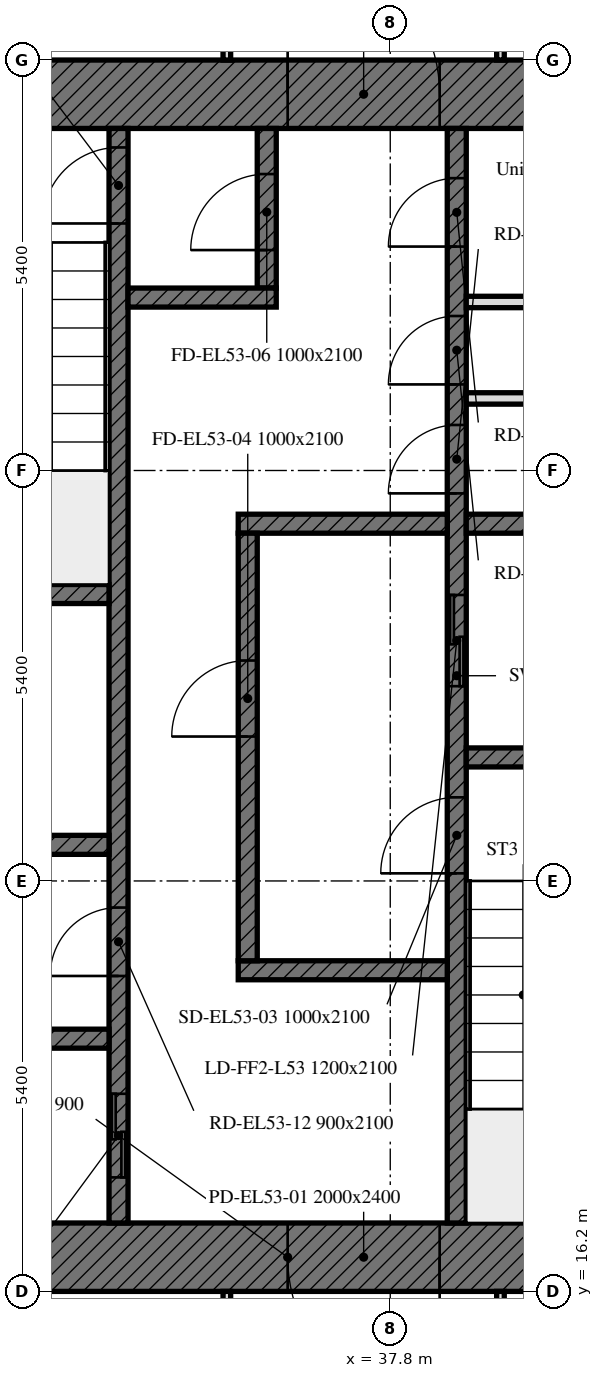
"""IFC4 building model, lengths in metres.
Left out: names, types, materials, properties, quantities, classifications, styles, units other than length and angle.
Written with IfcOpenShell. Run it as: python <this file> out.ifc"""

import sys

from ifc_helpers import new_model, si_unit, direction, frame, frame_2d, origin, place, context, subcontext, project, spatial, rectangle, extrude, element, fill, save


model = new_model("IFC4")
c1 = context("Model", 3, precision=1e-05, world=origin(), true_north=direction((0.0, 1.0)))
c2 = subcontext(c1, "Body", "Model", "MODEL_VIEW")
j1 = project(units=[si_unit("LENGTHUNIT", "METRE"), si_unit("PLANEANGLEUNIT", "RADIAN")], contexts=[c1])
p1 = place(None, origin())
s1 = spatial("IfcSite", under=j1, at=p1, CompositionType="ELEMENT")
p2 = place(p1, origin())
s2 = spatial("IfcBuilding", under=s1, at=p2, CompositionType="ELEMENT")
p3 = place(p2, frame((0.0, 0.0, 213.7)))
s3 = spatial("IfcBuildingStorey", under=s2, at=p3, CompositionType="ELEMENT", Elevation=213.7)
p4 = place(p3, frame((42.0, 16.65, 0.0), z_axis=(0.0, 0.0, 1.0), x_axis=(-1.0, 0.0, 0.0)))
e1 = element("IfcWall", 1, at=p4, inside=s3, PredefinedType="SOLIDWALL", context=c2, shape_type="SweptSolid", body=[
    extrude(rectangle(XDim=11.1, YDim=0.9, at=frame_2d((5.55, 0.0))), origin(), (0.0, 0.0, 1.0), 3.0),
])
p5 = place(p4, frame((3.55, 0.0, 0.0)))
e2 = element("IfcOpeningElement", 2, at=p5, cuts=e1, PredefinedType="OPENING", context=c2, shape_type="SweptSolid", body=[
    extrude(rectangle(XDim=2.0, YDim=2.4, at=frame_2d((1.0, 1.2))), frame((0.0, 0.45, 0.0), z_axis=(0.0, -1.0, 0.0), x_axis=(1.0, 0.0, 0.0)), (0.0, 0.0, 1.0), 0.9),
])
p6 = place(p3, frame((30.9, 31.95, 0.0), z_axis=(0.0, 0.0, 1.0), x_axis=(1.0, 0.0, 0.0)))
e3 = element("IfcWall", 3, at=p6, inside=s3, PredefinedType="SOLIDWALL", context=c2, shape_type="SweptSolid", body=[
    extrude(rectangle(XDim=11.1, YDim=0.9, at=frame_2d((5.55, 0.0))), origin(), (0.0, 0.0, 1.0), 3.0),
])
p7 = place(p6, frame((5.55, 0.0, 0.0)))
e4 = element("IfcOpeningElement", 4, at=p7, cuts=e3, PredefinedType="OPENING", context=c2, shape_type="SweptSolid", body=[
    extrude(rectangle(XDim=2.0, YDim=2.4, at=frame_2d((1.0, 1.2))), frame((0.0, 0.45, 0.0), z_axis=(0.0, -1.0, 0.0), x_axis=(1.0, 0.0, 0.0)), (0.0, 0.0, 1.0), 0.9),
])
p8 = place(p3, frame((38.675, 17.1, 0.0), z_axis=(0.0, 0.0, 1.0), x_axis=(0.0, 1.0, 0.0)))
e5 = element("IfcWall", 5, at=p8, inside=s3, PredefinedType="SOLIDWALL", context=c2, shape_type="SweptSolid", body=[
    extrude(rectangle(XDim=14.4, YDim=0.25, at=frame_2d((7.2, 0.0))), origin(), (0.0, 0.0, 1.0), 3.0),
])
p9 = place(p8, frame((4.6, 0.0, 0.0)))
e6 = element("IfcOpeningElement", 6, at=p9, cuts=e5, PredefinedType="OPENING", context=c2, shape_type="SweptSolid", body=[
    extrude(rectangle(XDim=1.0, YDim=2.1, at=frame_2d((0.5, 1.05))), frame((0.0, 0.125, 0.0), z_axis=(0.0, -1.0, 0.0), x_axis=(1.0, 0.0, 0.0)), (0.0, 0.0, 1.0), 0.25),
])
p10 = place(p8, frame((7.062, 0.0, 0.0)))
e7 = element("IfcOpeningElement", 7, at=p10, cuts=e5, PredefinedType="OPENING", context=c2, shape_type="SweptSolid", body=[
    extrude(rectangle(XDim=1.2, YDim=2.1, at=frame_2d((0.6, 1.05))), frame((0.0, 0.125, 0.0), z_axis=(0.0, -1.0, 0.0), x_axis=(1.0, 0.0, 0.0)), (0.0, 0.0, 1.0), 0.25),
])
p11 = place(p8, frame((9.599, 0.0, 0.0)))
e8 = element("IfcOpeningElement", 8, at=p11, cuts=e5, PredefinedType="OPENING", context=c2, shape_type="SweptSolid", body=[
    extrude(rectangle(XDim=0.9, YDim=2.1, at=frame_2d((0.45, 1.05))), frame((0.0, 0.125, 0.0), z_axis=(0.0, -1.0, 0.0), x_axis=(1.0, 0.0, 0.0)), (0.0, 0.0, 1.0), 0.25),
])
p12 = place(p8, frame((11.032, 0.0, 0.0)))
e9 = element("IfcOpeningElement", 9, at=p12, cuts=e5, PredefinedType="OPENING", context=c2, shape_type="SweptSolid", body=[
    extrude(rectangle(XDim=0.9, YDim=2.1, at=frame_2d((0.45, 1.05))), frame((0.0, 0.125, 0.0), z_axis=(0.0, -1.0, 0.0), x_axis=(1.0, 0.0, 0.0)), (0.0, 0.0, 1.0), 0.25),
])
p13 = place(p8, frame((12.846, 0.0, 0.0)))
e10 = element("IfcOpeningElement", 10, at=p13, cuts=e5, PredefinedType="OPENING", context=c2, shape_type="SweptSolid", body=[
    extrude(rectangle(XDim=0.9, YDim=2.1, at=frame_2d((0.45, 1.05))), frame((0.0, 0.125, 0.0), z_axis=(0.0, -1.0, 0.0), x_axis=(1.0, 0.0, 0.0)), (0.0, 0.0, 1.0), 0.25),
])
p14 = place(p3, frame((34.225, 17.1, 0.0), z_axis=(0.0, 0.0, 1.0), x_axis=(0.0, 1.0, 0.0)))
e11 = element("IfcWall", 11, at=p14, inside=s3, PredefinedType="SOLIDWALL", context=c2, shape_type="SweptSolid", body=[
    extrude(rectangle(XDim=14.4, YDim=0.25, at=frame_2d((7.2, 0.0))), origin(), (0.0, 0.0, 1.0), 3.0),
])
p15 = place(p14, frame((13.15, 0.0, 0.0)))
e12 = element("IfcOpeningElement", 12, at=p15, cuts=e11, PredefinedType="OPENING", context=c2, shape_type="SweptSolid", body=[
    extrude(rectangle(XDim=1.0, YDim=2.1, at=frame_2d((0.5, 1.05))), frame((0.0, 0.125, 0.0), z_axis=(0.0, -1.0, 0.0), x_axis=(1.0, 0.0, 0.0)), (0.0, 0.0, 1.0), 0.25),
])
p16 = place(p14, frame((0.6, 0.0, 0.0)))
e13 = element("IfcOpeningElement", 13, at=p16, cuts=e11, PredefinedType="OPENING", context=c2, shape_type="SweptSolid", body=[
    extrude(rectangle(XDim=1.1, YDim=2.1, at=frame_2d((0.55, 1.05))), frame((0.0, 0.125, 0.0), z_axis=(0.0, -1.0, 0.0), x_axis=(1.0, 0.0, 0.0)), (0.0, 0.0, 1.0), 0.25),
])
p17 = place(p14, frame((3.25, 0.0, 0.0)))
e14 = element("IfcOpeningElement", 14, at=p17, cuts=e11, PredefinedType="OPENING", context=c2, shape_type="SweptSolid", body=[
    extrude(rectangle(XDim=0.9, YDim=2.1, at=frame_2d((0.45, 1.05))), frame((0.0, 0.125, 0.0), z_axis=(0.0, -1.0, 0.0), x_axis=(1.0, 0.0, 0.0)), (0.0, 0.0, 1.0), 0.25),
])
p18 = place(p3, frame((38.8, 23.225, 0.0), z_axis=(0.0, 0.0, 1.0), x_axis=(1.0, 0.0, 0.0)))
e15 = element("IfcWall", 15, at=p18, inside=s3, PredefinedType="SOLIDWALL", context=c2, shape_type="SweptSolid", body=[
    extrude(rectangle(XDim=3.2, YDim=0.25, at=frame_2d((1.6, 0.0))), origin(), (0.0, 0.0, 1.0), 3.0),
])
for number, where, z_axis, x_axis in (
    (16, (30.9, 25.375, 0.0), (0.0, 0.0, 1.0), (1.0, 0.0, 0.0)),
    (17, (30.9, 22.075, 0.0), (0.0, 0.0, 1.0), (1.0, 0.0, 0.0)),
):
    element("IfcWall", number, at=place(p3, frame(where, z_axis=z_axis, x_axis=x_axis)), inside=s3, PredefinedType="SOLIDWALL", context=c2, shape_type="SweptSolid", body=[
        extrude(rectangle(XDim=3.2, YDim=0.25, at=frame_2d((1.6, 0.0))), origin(), (0.0, 0.0, 1.0), 3.0),
    ])
p19 = place(p3, frame((38.8, 26.3, 0.0), z_axis=(0.0, 0.0, 1.0), x_axis=(1.0, 0.0, 0.0)))
e18 = element("IfcWall", 18, at=p19, inside=s3, PredefinedType="SOLIDWALL", context=c2, shape_type="SweptSolid", body=[
    extrude(rectangle(XDim=3.2, YDim=0.25, at=frame_2d((1.6, 0.0))), origin(), (0.0, 0.0, 1.0), 3.0),
])
for number, where, z_axis, x_axis in (
    (19, (35.8, 26.3, 0.0), (0.0, 0.0, 1.0), (1.0, 0.0, 0.0)),
    (20, (35.8, 20.425, 0.0), (0.0, 0.0, 1.0), (1.0, 0.0, 0.0)),
):
    element("IfcWall", number, at=place(p3, frame(where, z_axis=z_axis, x_axis=x_axis)), inside=s3, PredefinedType="SOLIDWALL", context=c2, shape_type="SweptSolid", body=[
        extrude(rectangle(XDim=2.75, YDim=0.25, at=frame_2d((1.375, 0.0))), origin(), (0.0, 0.0, 1.0), 3.0),
    ])
p20 = place(p3, frame((36.175, 29.4, 0.0), z_axis=(0.0, 0.0, 1.0), x_axis=(0.0, 1.0, 0.0)))
e21 = element("IfcWall", 21, at=p20, inside=s3, PredefinedType="SOLIDWALL", context=c2, shape_type="SweptSolid", body=[
    extrude(rectangle(XDim=2.1, YDim=0.25, at=frame_2d((1.05, 0.0))), origin(), (0.0, 0.0, 1.0), 3.0),
])
p21 = place(p20, frame((0.5, 0.0, 0.0)))
e22 = element("IfcOpeningElement", 22, at=p21, cuts=e21, PredefinedType="OPENING", context=c2, shape_type="SweptSolid", body=[
    extrude(rectangle(XDim=1.0, YDim=2.1, at=frame_2d((0.5, 1.05))), frame((0.0, 0.125, 0.0), z_axis=(0.0, -1.0, 0.0), x_axis=(1.0, 0.0, 0.0)), (0.0, 0.0, 1.0), 0.25),
])
p22 = place(p3, frame((34.35, 29.275, 0.0), z_axis=(0.0, 0.0, 1.0), x_axis=(1.0, 0.0, 0.0)))
e23 = element("IfcWall", 23, at=p22, inside=s3, PredefinedType="SOLIDWALL", context=c2, shape_type="SweptSolid", body=[
    extrude(rectangle(XDim=1.95, YDim=0.25, at=frame_2d((0.975, 0.0))), origin(), (0.0, 0.0, 1.0), 3.0),
])
p23 = place(p3, frame((35.925, 20.55, 0.0), z_axis=(0.0, 0.0, 1.0), x_axis=(0.0, 1.0, 0.0)))
e24 = element("IfcWall", 24, at=p23, inside=s3, PredefinedType="SOLIDWALL", context=c2, shape_type="SweptSolid", body=[
    extrude(rectangle(XDim=5.625, YDim=0.25, at=frame_2d((2.812, 0.0))), origin(), (0.0, 0.0, 1.0), 3.0),
])
p24 = place(p23, frame((2.95, 0.0, 0.0)))
e25 = element("IfcOpeningElement", 25, at=p24, cuts=e24, PredefinedType="OPENING", context=c2, shape_type="SweptSolid", body=[
    extrude(rectangle(XDim=1.0, YDim=2.1, at=frame_2d((0.5, 1.05))), frame((0.0, 0.125, 0.0), z_axis=(0.0, -1.0, 0.0), x_axis=(1.0, 0.0, 0.0)), (0.0, 0.0, 1.0), 0.25),
])
p25 = place(p3, frame((30.9, 19.525, 0.0), z_axis=(0.0, 0.0, 1.0), x_axis=(1.0, 0.0, 0.0)))
e26 = element("IfcWall", 26, at=p25, inside=s3, PredefinedType="SOLIDWALL", context=c2, shape_type="SweptSolid", body=[
    extrude(rectangle(XDim=3.2, YDim=0.25, at=frame_2d((1.6, 0.0))), origin(), (0.0, 0.0, 1.0), 3.0),
])
for number, where, z_axis, x_axis in (
    (27, (38.8, 27.948, 0.0), (0.0, 0.0, 1.0), (1.0, 0.0, 0.0)),
    (28, (38.8, 29.217, 0.0), (0.0, 0.0, 1.0), (1.0, 0.0, 0.0)),
):
    element("IfcWall", number, at=place(p3, frame(where, z_axis=z_axis, x_axis=x_axis)), inside=s3, PredefinedType="PARTITIONING", context=c2, shape_type="SweptSolid", body=[
        extrude(rectangle(XDim=3.2, YDim=0.15, at=frame_2d((1.6, 0.0))), origin(), (0.0, 0.0, 1.0), 3.0),
    ])
for number, where, z_axis, x_axis in (
    (29, (39.25, 32.4, 0.0), (0.0, 0.0, 1.0), (0.0, 1.0, 0.0)),
    (30, (35.65, 38.175, 0.0), (0.0, 0.0, 1.0), (0.0, -1.0, 0.0)),
):
    element("IfcWall", number, at=place(p3, frame(where, z_axis=z_axis, x_axis=x_axis)), inside=s3, PredefinedType="PARTITIONING", context=c2, shape_type="SweptSolid", body=[
        extrude(rectangle(XDim=5.775, YDim=0.1, at=frame_2d((2.888, 0.0))), origin(), (0.0, 0.0, 1.0), 3.0),
    ])
for number, where, z_axis, x_axis in (
    (31, (39.25, 13.575, 0.0), (0.0, 0.0, 1.0), (0.0, 1.0, 0.0)),
    (32, (35.65, 16.2, 0.0), (0.0, 0.0, 1.0), (0.0, -1.0, 0.0)),
):
    element("IfcWall", number, at=place(p3, frame(where, z_axis=z_axis, x_axis=x_axis)), inside=s3, PredefinedType="PARTITIONING", context=c2, shape_type="SweptSolid", body=[
        extrude(rectangle(XDim=2.625, YDim=0.1, at=frame_2d((1.312, 0.0))), origin(), (0.0, 0.0, 1.0), 3.0),
    ])
p26 = place(p5, origin())
e33 = element("IfcDoor", 33, at=p26, inside=s3, OperationType="DOUBLE_DOOR_SINGLE_SWING", PredefinedType="DOOR", context=c2, shape_type="SweptSolid", body=[
    extrude(rectangle(XDim=2.0, YDim=2.4, at=frame_2d((1.0, 1.2))), frame((0.0, 0.025, 0.0), z_axis=(0.0, -1.0, 0.0), x_axis=(1.0, 0.0, 0.0)), (0.0, 0.0, 1.0), 0.05),
])
fill(e2, e33)
p27 = place(p7, origin())
e34 = element("IfcDoor", 34, at=p27, inside=s3, OperationType="DOUBLE_DOOR_SINGLE_SWING", PredefinedType="DOOR", context=c2, shape_type="SweptSolid", body=[
    extrude(rectangle(XDim=2.0, YDim=2.4, at=frame_2d((1.0, 1.2))), frame((0.0, 0.025, 0.0), z_axis=(0.0, -1.0, 0.0), x_axis=(1.0, 0.0, 0.0)), (0.0, 0.0, 1.0), 0.05),
])
fill(e4, e34)
p28 = place(p9, origin())
e35 = element("IfcDoor", 35, at=p28, inside=s3, OperationType="SINGLE_SWING_LEFT", PredefinedType="DOOR", context=c2, shape_type="SweptSolid", body=[
    extrude(rectangle(XDim=1.0, YDim=2.1, at=frame_2d((0.5, 1.05))), frame((0.0, 0.025, 0.0), z_axis=(0.0, -1.0, 0.0), x_axis=(1.0, 0.0, 0.0)), (0.0, 0.0, 1.0), 0.05),
])
fill(e6, e35)
p29 = place(p24, origin())
e36 = element("IfcDoor", 36, at=p29, inside=s3, OperationType="SINGLE_SWING_LEFT", PredefinedType="DOOR", context=c2, shape_type="SweptSolid", body=[
    extrude(rectangle(XDim=1.0, YDim=2.1, at=frame_2d((0.5, 1.05))), frame((0.0, 0.025, 0.0), z_axis=(0.0, -1.0, 0.0), x_axis=(1.0, 0.0, 0.0)), (0.0, 0.0, 1.0), 0.05),
])
fill(e25, e36)
p30 = place(p15, origin())
e37 = element("IfcDoor", 37, at=p30, inside=s3, OperationType="SINGLE_SWING_LEFT", PredefinedType="DOOR", context=c2, shape_type="SweptSolid", body=[
    extrude(rectangle(XDim=1.0, YDim=2.1, at=frame_2d((0.5, 1.05))), frame((0.0, 0.025, 0.0), z_axis=(0.0, -1.0, 0.0), x_axis=(1.0, 0.0, 0.0)), (0.0, 0.0, 1.0), 0.05),
])
fill(e12, e37)
p31 = place(p21, origin())
e38 = element("IfcDoor", 38, at=p31, inside=s3, OperationType="SINGLE_SWING_LEFT", PredefinedType="DOOR", context=c2, shape_type="SweptSolid", body=[
    extrude(rectangle(XDim=1.0, YDim=2.1, at=frame_2d((0.5, 1.05))), frame((0.0, 0.025, 0.0), z_axis=(0.0, -1.0, 0.0), x_axis=(1.0, 0.0, 0.0)), (0.0, 0.0, 1.0), 0.05),
])
fill(e22, e38)
p32 = place(p10, origin())
e39 = element("IfcDoor", 39, at=p32, inside=s3, OperationType="DOUBLE_DOOR_SLIDING", PredefinedType="DOOR", context=c2, shape_type="SweptSolid", body=[
    extrude(rectangle(XDim=1.2, YDim=2.1, at=frame_2d((0.6, 1.05))), frame((0.0, 0.025, 0.0), z_axis=(0.0, -1.0, 0.0), x_axis=(1.0, 0.0, 0.0)), (0.0, 0.0, 1.0), 0.05),
])
fill(e7, e39)
p33 = place(p16, origin())
e40 = element("IfcDoor", 40, at=p33, inside=s3, OperationType="DOUBLE_DOOR_SLIDING", PredefinedType="DOOR", context=c2, shape_type="SweptSolid", body=[
    extrude(rectangle(XDim=1.1, YDim=2.1, at=frame_2d((0.55, 1.05))), frame((0.0, 0.025, 0.0), z_axis=(0.0, -1.0, 0.0), x_axis=(1.0, 0.0, 0.0)), (0.0, 0.0, 1.0), 0.05),
])
fill(e13, e40)
p34 = place(p11, origin())
e41 = element("IfcDoor", 41, at=p34, inside=s3, OperationType="SINGLE_SWING_LEFT", PredefinedType="DOOR", context=c2, shape_type="SweptSolid", body=[
    extrude(rectangle(XDim=0.9, YDim=2.1, at=frame_2d((0.45, 1.05))), frame((0.0, 0.025, 0.0), z_axis=(0.0, -1.0, 0.0), x_axis=(1.0, 0.0, 0.0)), (0.0, 0.0, 1.0), 0.05),
])
fill(e8, e41)
p35 = place(p12, origin())
e42 = element("IfcDoor", 42, at=p35, inside=s3, OperationType="SINGLE_SWING_LEFT", PredefinedType="DOOR", context=c2, shape_type="SweptSolid", body=[
    extrude(rectangle(XDim=0.9, YDim=2.1, at=frame_2d((0.45, 1.05))), frame((0.0, 0.025, 0.0), z_axis=(0.0, -1.0, 0.0), x_axis=(1.0, 0.0, 0.0)), (0.0, 0.0, 1.0), 0.05),
])
fill(e9, e42)
p36 = place(p13, origin())
e43 = element("IfcDoor", 43, at=p36, inside=s3, OperationType="SINGLE_SWING_LEFT", PredefinedType="DOOR", context=c2, shape_type="SweptSolid", body=[
    extrude(rectangle(XDim=0.9, YDim=2.1, at=frame_2d((0.45, 1.05))), frame((0.0, 0.025, 0.0), z_axis=(0.0, -1.0, 0.0), x_axis=(1.0, 0.0, 0.0)), (0.0, 0.0, 1.0), 0.05),
])
fill(e10, e43)
p37 = place(p17, origin())
e44 = element("IfcDoor", 44, at=p37, inside=s3, OperationType="SINGLE_SWING_LEFT", PredefinedType="DOOR", context=c2, shape_type="SweptSolid", body=[
    extrude(rectangle(XDim=0.9, YDim=2.1, at=frame_2d((0.45, 1.05))), frame((0.0, 0.025, 0.0), z_axis=(0.0, -1.0, 0.0), x_axis=(1.0, 0.0, 0.0)), (0.0, 0.0, 1.0), 0.05),
])
fill(e14, e44)
save(model, sys.argv[1])
